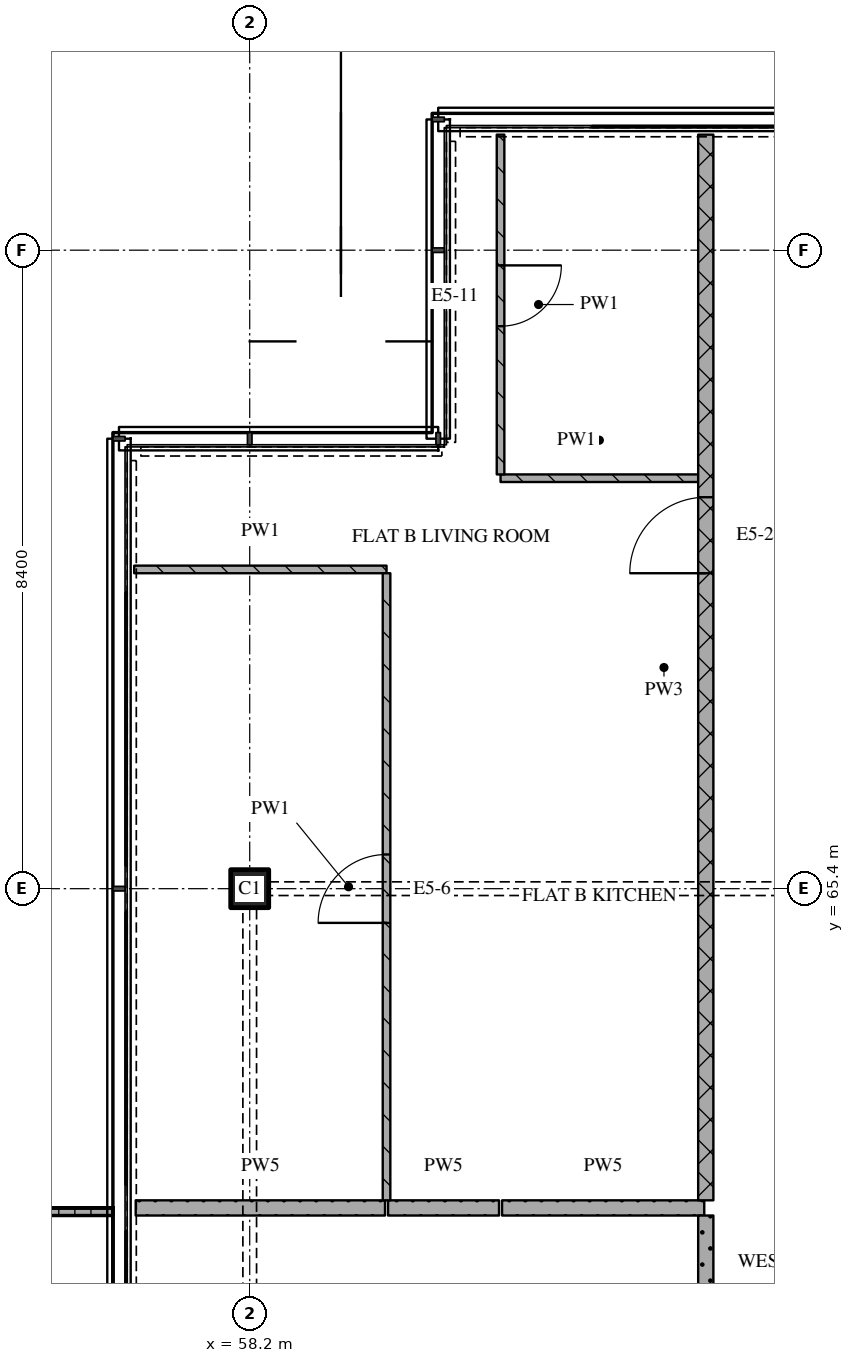
"""IFC4 building model, lengths in metres.
Left out: names, types, materials, properties, quantities, classifications, styles, units other than length and angle.
Written with IfcOpenShell. Run it as: python <this file> out.ifc"""

import sys

from ifc_helpers import new_model, si_unit, direction, frame, frame_2d, origin, origin_2d, place, context, subcontext, project, spatial, polyline, rectangle, outline, extrude, element, fill, save


model = new_model("IFC4")
c1 = context("Model", 3, precision=1e-05, world=origin(), true_north=direction((0.0, 1.0)))
c2 = subcontext(c1, "Body", "Model", "MODEL_VIEW")
j1 = project(units=[si_unit("LENGTHUNIT", "METRE"), si_unit("PLANEANGLEUNIT", "RADIAN")], contexts=[c1])
p1 = place(None, origin())
s1 = spatial("IfcSite", under=j1, at=p1, CompositionType="ELEMENT")
p2 = place(p1, origin())
s2 = spatial("IfcBuilding", under=s1, at=p2, CompositionType="ELEMENT")
p3 = place(p2, frame((0.0, 0.0, 288.75)))
s3 = spatial("IfcBuildingStorey", under=s2, at=p3, CompositionType="ELEMENT", Elevation=288.75)
p4 = place(p3, frame((58.2, 65.4, 0.0), z_axis=(0.0, 0.0, 1.0), x_axis=(1.0, 0.0, 0.0)))
e1 = element("IfcColumn", 1, at=p4, inside=s3, PredefinedType="COLUMN", context=c2, shape_type="SweptSolid", body=[
    extrude(rectangle(XDim=0.5, YDim=0.5, at=origin_2d()), origin(), (0.0, 0.0, 1.0), 3.6),
])
p5 = place(p3, origin())
e2 = element("IfcWall", 2, at=p5, inside=s3, PredefinedType="SOLIDWALL", context=c2, shape_type="SweptSolid", body=[
    extrude(outline(polyline([(56.4, 61.2), (56.4, 61.1), (54.767, 61.1), (54.767, 57.1), (56.4, 57.1), (56.4, 57.0), (54.667, 57.0), (54.667, 61.2), (56.4, 61.2)])), origin(), (0.0, 0.0, 1.0), 1.0),
])
p6 = place(p3, frame((56.7, 61.2, 0.0), z_axis=(0.0, 0.0, 1.0), x_axis=(1.0, 0.0, 0.0)))
e3 = element("IfcWall", 3, at=p6, inside=s3, PredefinedType="PARTITIONING", context=c2, shape_type="SweptSolid", body=[
    extrude(rectangle(XDim=3.28, YDim=0.2, at=frame_2d((1.64, 0.0))), origin(), (0.0, 0.0, 1.0), 3.32),
])
p7 = place(p3, frame((60.02, 61.2, 0.0), z_axis=(0.0, 0.0, 1.0), x_axis=(1.0, 0.0, 0.0)))
e4 = element("IfcWall", 4, at=p7, inside=s3, PredefinedType="PARTITIONING", context=c2, shape_type="SweptSolid", body=[
    extrude(rectangle(XDim=1.46, YDim=0.2, at=frame_2d((0.73, 0.0))), origin(), (0.0, 0.0, 1.0), 3.32),
])
p8 = place(p3, frame((61.52, 61.2, 0.0), z_axis=(0.0, 0.0, 1.0), x_axis=(1.0, 0.0, 0.0)))
e5 = element("IfcWall", 5, at=p8, inside=s3, PredefinedType="PARTITIONING", context=c2, shape_type="SweptSolid", body=[
    extrude(rectangle(XDim=2.66, YDim=0.2, at=frame_2d((1.33, 0.0))), origin(), (0.0, 0.0, 1.0), 3.32),
])
p9 = place(p3, frame((56.68, 69.6, 0.0), z_axis=(0.0, 0.0, 1.0), x_axis=(1.0, 0.0, 0.0)))
e6 = element("IfcWall", 6, at=p9, inside=s3, PredefinedType="PARTITIONING", context=c2, shape_type="SweptSolid", body=[
    extrude(rectangle(XDim=3.32, YDim=0.1, at=frame_2d((1.66, 0.0))), origin(), (0.0, 0.0, 1.0), 3.32),
])
p10 = place(p3, frame((61.5, 70.8, 0.0), z_axis=(0.0, 0.0, 1.0), x_axis=(1.0, 0.0, 0.0)))
e7 = element("IfcWall", 7, at=p10, inside=s3, PredefinedType="PARTITIONING", context=c2, shape_type="SweptSolid", body=[
    extrude(rectangle(XDim=2.6, YDim=0.1, at=frame_2d((1.3, 0.0))), origin(), (0.0, 0.0, 1.0), 3.32),
])
p11 = place(p3, frame((60.0, 61.3, 0.0), z_axis=(0.0, 0.0, 1.0), x_axis=(0.0, 1.0, 0.0)))
e8 = element("IfcWall", 8, at=p11, inside=s3, PredefinedType="PARTITIONING", context=c2, shape_type="SweptSolid", body=[
    extrude(rectangle(XDim=8.25, YDim=0.1, at=frame_2d((4.125, 0.0))), origin(), (0.0, 0.0, 1.0), 3.32),
])
p12 = place(p11, frame((3.65, 0.0, 0.0)))
e9 = element("IfcOpeningElement", 9, at=p12, cuts=e8, PredefinedType="OPENING", context=c2, shape_type="SweptSolid", body=[
    extrude(rectangle(XDim=0.9, YDim=2.1, at=frame_2d((0.45, 1.05))), frame((0.0, 0.06, 0.0), z_axis=(0.0, -1.0, 0.0), x_axis=(1.0, 0.0, 0.0)), (0.0, 0.0, 1.0), 0.12),
])
p13 = place(p3, frame((61.5, 75.32, 0.0), z_axis=(0.0, 0.0, 1.0), x_axis=(0.0, -1.0, 0.0)))
e10 = element("IfcWall", 10, at=p13, inside=s3, PredefinedType="PARTITIONING", context=c2, shape_type="SweptSolid", body=[
    extrude(rectangle(XDim=4.47, YDim=0.1, at=frame_2d((2.235, 0.0))), origin(), (0.0, 0.0, 1.0), 3.32),
])
p14 = place(p13, frame((1.72, 0.0, 0.0)))
e11 = element("IfcOpeningElement", 11, at=p14, cuts=e10, PredefinedType="OPENING", context=c2, shape_type="SweptSolid", body=[
    extrude(rectangle(XDim=0.8, YDim=2.1, at=frame_2d((0.4, 1.05))), frame((0.0, 0.06, 0.0), z_axis=(0.0, -1.0, 0.0), x_axis=(1.0, 0.0, 0.0)), (0.0, 0.0, 1.0), 0.12),
])
p15 = place(p3, frame((64.2, 61.3, 0.0), z_axis=(0.0, 0.0, 1.0), x_axis=(0.0, 1.0, 0.0)))
e12 = element("IfcWall", 12, at=p15, inside=s3, PredefinedType="PARTITIONING", context=c2, shape_type="SweptSolid", body=[
    extrude(rectangle(XDim=14.02, YDim=0.2, at=frame_2d((7.01, 0.0))), origin(), (0.0, 0.0, 1.0), 3.32),
])
p16 = place(p15, frame((8.25, 0.0, 0.0)))
e13 = element("IfcOpeningElement", 13, at=p16, cuts=e12, PredefinedType="OPENING", context=c2, shape_type="SweptSolid", body=[
    extrude(rectangle(XDim=1.0, YDim=2.1, at=frame_2d((0.5, 1.05))), frame((0.0, 0.11, 0.0), z_axis=(0.0, -1.0, 0.0), x_axis=(1.0, 0.0, 0.0)), (0.0, 0.0, 1.0), 0.22),
])
p17 = place(p3, frame((64.2, 61.1, 0.0), z_axis=(0.0, 0.0, 1.0), x_axis=(0.0, -1.0, 0.0)))
e14 = element("IfcWall", 14, at=p17, inside=s3, PredefinedType="PARTITIONING", context=c2, shape_type="SweptSolid", body=[
    extrude(rectangle(XDim=2.2, YDim=0.2, at=frame_2d((1.1, 0.0))), origin(), (0.0, 0.0, 1.0), 3.32),
])
p18 = place(p12, origin())
e15 = element("IfcDoor", 15, at=p18, inside=s3, OperationType="SINGLE_SWING_LEFT", PredefinedType="DOOR", context=c2, shape_type="SweptSolid", body=[
    extrude(rectangle(XDim=0.9, YDim=2.1, at=frame_2d((0.45, 1.05))), frame((0.0, 0.025, 0.0), z_axis=(0.0, -1.0, 0.0), x_axis=(1.0, 0.0, 0.0)), (0.0, 0.0, 1.0), 0.05),
])
fill(e9, e15)
p19 = place(p14, origin())
e16 = element("IfcDoor", 16, at=p19, inside=s3, OperationType="SINGLE_SWING_LEFT", PredefinedType="DOOR", context=c2, shape_type="SweptSolid", body=[
    extrude(rectangle(XDim=0.8, YDim=2.1, at=frame_2d((0.4, 1.05))), frame((0.0, 0.025, 0.0), z_axis=(0.0, -1.0, 0.0), x_axis=(1.0, 0.0, 0.0)), (0.0, 0.0, 1.0), 0.05),
])
fill(e11, e16)
p20 = place(p16, origin())
e17 = element("IfcDoor", 17, at=p20, inside=s3, OperationType="SINGLE_SWING_LEFT", PredefinedType="DOOR", context=c2, shape_type="SweptSolid", body=[
    extrude(rectangle(XDim=1.0, YDim=2.1, at=frame_2d((0.5, 1.05))), frame((0.0, 0.025, 0.0), z_axis=(0.0, -1.0, 0.0), x_axis=(1.0, 0.0, 0.0)), (0.0, 0.0, 1.0), 0.05),
])
fill(e13, e17)
save(model, sys.argv[1])
